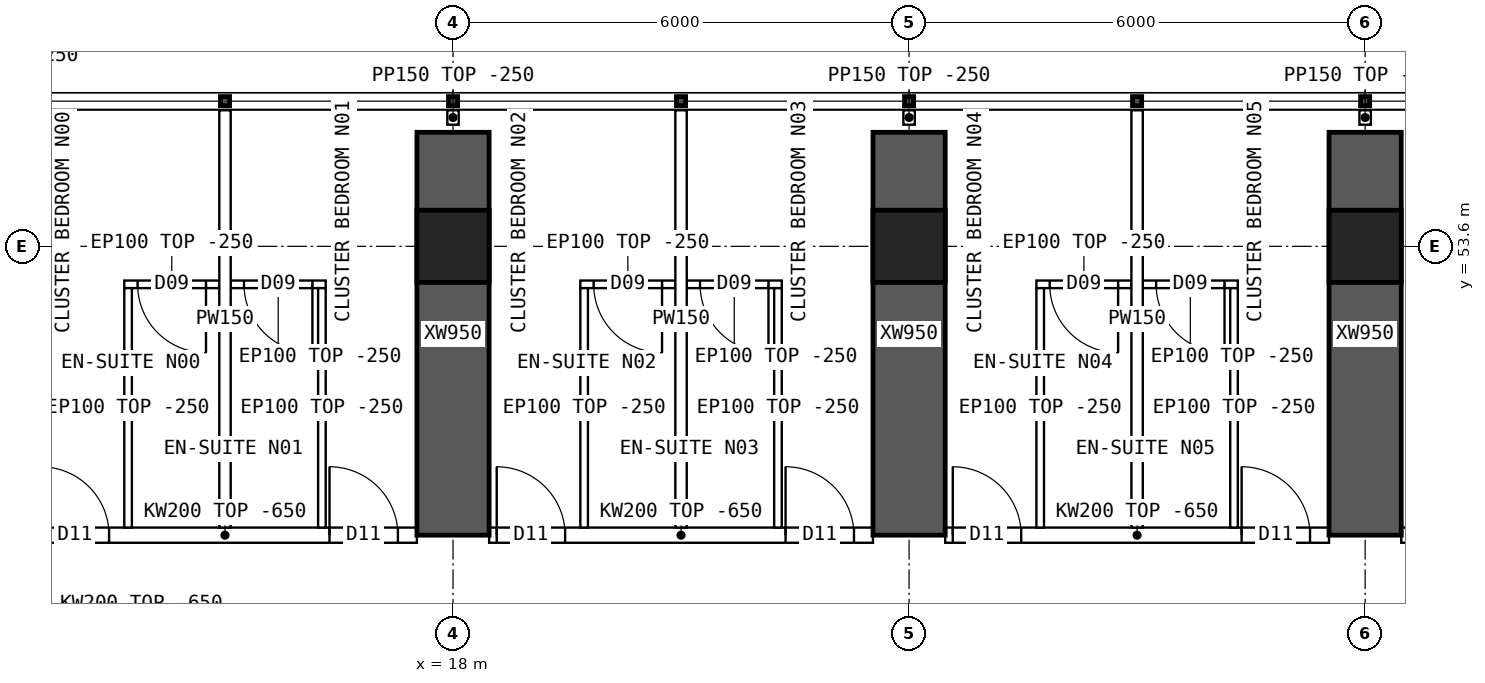
"""IFC4 building model, lengths in metres.
Left out: names, types, materials, properties, quantities, classifications, styles, units other than length and angle.
Written with IfcOpenShell. Run it as: python <this file> out.ifc"""

import sys

from ifc_helpers import new_model, si_unit, direction, frame, frame_2d, origin, origin_2d, place, context, subcontext, project, spatial, polyline, rectangle, hollow_rectangle, outline, extrude, element, fill, save


model = new_model("IFC4")
c1 = context("Model", 3, precision=1e-05, world=origin(), true_north=direction((0.0, 1.0)))
c2 = subcontext(c1, "Body", "Model", "MODEL_VIEW")
j1 = project(units=[si_unit("LENGTHUNIT", "METRE"), si_unit("PLANEANGLEUNIT", "RADIAN")], contexts=[c1])
p1 = place(None, origin())
s1 = spatial("IfcSite", under=j1, at=p1, CompositionType="ELEMENT")
p2 = place(p1, origin())
s2 = spatial("IfcBuilding", under=s1, at=p2, CompositionType="ELEMENT")
p3 = place(p2, frame((0.0, 0.0, 121.9)))
s3 = spatial("IfcBuildingStorey", under=s2, at=p3, CompositionType="ELEMENT", Elevation=121.9)
for number, where, z_axis, x_axis in (
    (1, (18.0, 53.6, 0.0), (0.0, 0.0, 1.0), (1.0, 0.0, 0.0)),
    (2, (24.0, 53.6, 0.0), (0.0, 0.0, 1.0), (1.0, 0.0, 0.0)),
    (3, (30.0, 53.6, 0.0), (0.0, 0.0, 1.0), (1.0, 0.0, 0.0)),
):
    element("IfcColumn", number, at=place(p3, frame(where, z_axis=z_axis, x_axis=x_axis)), inside=s3, PredefinedType="COLUMN", context=c2, shape_type="SweptSolid", body=[
        extrude(hollow_rectangle(XDim=0.95, YDim=0.95, WallThickness=0.095, at=origin_2d()), origin(), (0.0, 0.0, 1.0), 3.75),
    ])
for number, where, z_axis, x_axis in (
    (4, (18.0, 49.8, 0.0), (0.0, 0.0, 1.0), (0.0, 1.0, 0.0)),
    (5, (24.0, 49.8, 0.0), (0.0, 0.0, 1.0), (0.0, 1.0, 0.0)),
    (6, (30.0, 49.8, 0.0), (0.0, 0.0, 1.0), (0.0, 1.0, 0.0)),
):
    element("IfcWall", number, at=place(p3, frame(where, z_axis=z_axis, x_axis=x_axis)), inside=s3, PredefinedType="SHEAR", context=c2, shape_type="SweptSolid", body=[
        extrude(rectangle(XDim=5.3, YDim=0.95, at=frame_2d((2.65, 0.0))), origin(), (0.0, 0.0, 1.0), 3.75),
    ])
p4 = place(p3, frame((12.475, 49.8, 0.0), z_axis=(0.0, 0.0, 1.0), x_axis=(1.0, 0.0, 0.0)))
e7 = element("IfcWall", 7, at=p4, inside=s3, PredefinedType="SOLIDWALL", context=c2, shape_type="SweptSolid", body=[
    extrude(outline(polyline([(0.0, 0.0), (5.05, 0.0), (5.05, 3.1), (0.0, 3.1), (0.0, 0.0)])), frame((0.0, 0.1, 0.0), z_axis=(0.0, -1.0, 0.0), x_axis=(1.0, 0.0, 0.0)), (0.0, 0.0, 1.0), 0.2),
])
p5 = place(p4, frame((0.1, 0.0, 0.0)))
e8 = element("IfcOpeningElement", 8, at=p5, cuts=e7, PredefinedType="OPENING", context=c2, shape_type="SweptSolid", body=[
    extrude(rectangle(XDim=0.9, YDim=2.1, at=frame_2d((0.45, 1.05))), frame((0.0, 0.11, 0.0), z_axis=(0.0, -1.0, 0.0), x_axis=(1.0, 0.0, 0.0)), (0.0, 0.0, 1.0), 0.22),
])
p6 = place(p4, frame((3.9, 0.0, 0.0)))
e9 = element("IfcOpeningElement", 9, at=p6, cuts=e7, PredefinedType="OPENING", context=c2, shape_type="SweptSolid", body=[
    extrude(rectangle(XDim=0.9, YDim=2.1, at=frame_2d((0.45, 1.05))), frame((0.0, 0.11, 0.0), z_axis=(0.0, -1.0, 0.0), x_axis=(1.0, 0.0, 0.0)), (0.0, 0.0, 1.0), 0.22),
])
p7 = place(p3, frame((18.475, 49.8, 0.0), z_axis=(0.0, 0.0, 1.0), x_axis=(1.0, 0.0, 0.0)))
e10 = element("IfcWall", 10, at=p7, inside=s3, PredefinedType="SOLIDWALL", context=c2, shape_type="SweptSolid", body=[
    extrude(outline(polyline([(0.0, 0.0), (5.05, 0.0), (5.05, 3.1), (0.0, 3.1), (0.0, 0.0)])), frame((0.0, 0.1, 0.0), z_axis=(0.0, -1.0, 0.0), x_axis=(1.0, 0.0, 0.0)), (0.0, 0.0, 1.0), 0.2),
])
p8 = place(p7, frame((0.1, 0.0, 0.0)))
e11 = element("IfcOpeningElement", 11, at=p8, cuts=e10, PredefinedType="OPENING", context=c2, shape_type="SweptSolid", body=[
    extrude(rectangle(XDim=0.9, YDim=2.1, at=frame_2d((0.45, 1.05))), frame((0.0, 0.11, 0.0), z_axis=(0.0, -1.0, 0.0), x_axis=(1.0, 0.0, 0.0)), (0.0, 0.0, 1.0), 0.22),
])
p9 = place(p7, frame((3.9, 0.0, 0.0)))
e12 = element("IfcOpeningElement", 12, at=p9, cuts=e10, PredefinedType="OPENING", context=c2, shape_type="SweptSolid", body=[
    extrude(rectangle(XDim=0.9, YDim=2.1, at=frame_2d((0.45, 1.05))), frame((0.0, 0.11, 0.0), z_axis=(0.0, -1.0, 0.0), x_axis=(1.0, 0.0, 0.0)), (0.0, 0.0, 1.0), 0.22),
])
p10 = place(p3, frame((24.475, 49.8, 0.0), z_axis=(0.0, 0.0, 1.0), x_axis=(1.0, 0.0, 0.0)))
e13 = element("IfcWall", 13, at=p10, inside=s3, PredefinedType="SOLIDWALL", context=c2, shape_type="SweptSolid", body=[
    extrude(outline(polyline([(0.0, 0.0), (5.05, 0.0), (5.05, 3.1), (0.0, 3.1), (0.0, 0.0)])), frame((0.0, 0.1, 0.0), z_axis=(0.0, -1.0, 0.0), x_axis=(1.0, 0.0, 0.0)), (0.0, 0.0, 1.0), 0.2),
])
p11 = place(p10, frame((0.1, 0.0, 0.0)))
e14 = element("IfcOpeningElement", 14, at=p11, cuts=e13, PredefinedType="OPENING", context=c2, shape_type="SweptSolid", body=[
    extrude(rectangle(XDim=0.9, YDim=2.1, at=frame_2d((0.45, 1.05))), frame((0.0, 0.11, 0.0), z_axis=(0.0, -1.0, 0.0), x_axis=(1.0, 0.0, 0.0)), (0.0, 0.0, 1.0), 0.22),
])
p12 = place(p10, frame((3.9, 0.0, 0.0)))
e15 = element("IfcOpeningElement", 15, at=p12, cuts=e13, PredefinedType="OPENING", context=c2, shape_type="SweptSolid", body=[
    extrude(rectangle(XDim=0.9, YDim=2.1, at=frame_2d((0.45, 1.05))), frame((0.0, 0.11, 0.0), z_axis=(0.0, -1.0, 0.0), x_axis=(1.0, 0.0, 0.0)), (0.0, 0.0, 1.0), 0.22),
])
p13 = place(p3, frame((30.475, 49.8, 0.0), z_axis=(0.0, 0.0, 1.0), x_axis=(1.0, 0.0, 0.0)))
e16 = element("IfcWall", 16, at=p13, inside=s3, PredefinedType="SOLIDWALL", context=c2, shape_type="SweptSolid", body=[
    extrude(outline(polyline([(0.0, 0.0), (5.05, 0.0), (5.05, 3.1), (0.0, 3.1), (0.0, 0.0)])), frame((0.0, 0.1, 0.0), z_axis=(0.0, -1.0, 0.0), x_axis=(1.0, 0.0, 0.0)), (0.0, 0.0, 1.0), 0.2),
])
p14 = place(p13, frame((0.1, 0.0, 0.0)))
e17 = element("IfcOpeningElement", 17, at=p14, cuts=e16, PredefinedType="OPENING", context=c2, shape_type="SweptSolid", body=[
    extrude(rectangle(XDim=0.9, YDim=2.1, at=frame_2d((0.45, 1.05))), frame((0.0, 0.11, 0.0), z_axis=(0.0, -1.0, 0.0), x_axis=(1.0, 0.0, 0.0)), (0.0, 0.0, 1.0), 0.22),
])
p15 = place(p13, frame((3.9, 0.0, 0.0)))
e18 = element("IfcOpeningElement", 18, at=p15, cuts=e16, PredefinedType="OPENING", context=c2, shape_type="SweptSolid", body=[
    extrude(rectangle(XDim=0.9, YDim=2.1, at=frame_2d((0.45, 1.05))), frame((0.0, 0.11, 0.0), z_axis=(0.0, -1.0, 0.0), x_axis=(1.0, 0.0, 0.0)), (0.0, 0.0, 1.0), 0.22),
])
p16 = place(p3, frame((15.0, 55.39, 0.0), z_axis=(0.0, 0.0, 1.0), x_axis=(0.0, -1.0, 0.0)))
e19 = element("IfcWall", 19, at=p16, inside=s3, PredefinedType="PARTITIONING", context=c2, shape_type="SweptSolid", body=[
    extrude(outline(polyline([(0.0, 0.0), (5.49, 0.0), (5.49, 3.1), (5.442, 3.1), (5.44, 3.5), (1.992, 3.5), (1.99, 3.1), (1.592, 3.1), (1.59, 3.5), (0.0, 3.5), (0.0, 0.0)])), frame((0.0, 0.075, 0.0), z_axis=(0.0, -1.0, 0.0), x_axis=(1.0, 0.0, 0.0)), (0.0, 0.0, 1.0), 0.15),
])
p17 = place(p3, frame((13.675, 53.1, 0.0), z_axis=(0.0, 0.0, 1.0), x_axis=(1.0, 0.0, 0.0)))
e20 = element("IfcWall", 20, at=p17, inside=s3, PredefinedType="PARTITIONING", context=c2, shape_type="SweptSolid", body=[
    extrude(rectangle(XDim=1.25, YDim=0.1, at=frame_2d((0.625, 0.0))), origin(), (0.0, 0.0, 1.0), 3.5),
])
p18 = place(p17, frame((0.175, 0.0, 0.0)))
e21 = element("IfcOpeningElement", 21, at=p18, cuts=e20, PredefinedType="OPENING", context=c2, shape_type="SweptSolid", body=[
    extrude(rectangle(XDim=0.9, YDim=2.1, at=frame_2d((0.45, 1.05))), frame((0.0, 0.06, 0.0), z_axis=(0.0, -1.0, 0.0), x_axis=(1.0, 0.0, 0.0)), (0.0, 0.0, 1.0), 0.12),
])
p19 = place(p3, frame((13.725, 53.05, 0.0), z_axis=(0.0, 0.0, 1.0), x_axis=(0.0, -1.0, 0.0)))
e22 = element("IfcWall", 22, at=p19, inside=s3, PredefinedType="PARTITIONING", context=c2, shape_type="SweptSolid", body=[
    extrude(outline(polyline([(0.0, 0.0), (3.15, 0.0), (3.15, 3.1), (3.102, 3.1), (3.1, 3.5), (0.0, 3.5), (0.0, 0.0)])), frame((0.0, 0.05, 0.0), z_axis=(0.0, -1.0, 0.0), x_axis=(1.0, 0.0, 0.0)), (0.0, 0.0, 1.0), 0.1),
])
p20 = place(p3, frame((15.075, 53.1, 0.0), z_axis=(0.0, 0.0, 1.0), x_axis=(1.0, 0.0, 0.0)))
e23 = element("IfcWall", 23, at=p20, inside=s3, PredefinedType="PARTITIONING", context=c2, shape_type="SweptSolid", body=[
    extrude(rectangle(XDim=1.25, YDim=0.1, at=frame_2d((0.625, 0.0))), origin(), (0.0, 0.0, 1.0), 3.5),
])
p21 = place(p20, frame((0.175, 0.0, 0.0)))
e24 = element("IfcOpeningElement", 24, at=p21, cuts=e23, PredefinedType="OPENING", context=c2, shape_type="SweptSolid", body=[
    extrude(rectangle(XDim=0.9, YDim=2.1, at=frame_2d((0.45, 1.05))), frame((0.0, 0.06, 0.0), z_axis=(0.0, -1.0, 0.0), x_axis=(1.0, 0.0, 0.0)), (0.0, 0.0, 1.0), 0.12),
])
p22 = place(p3, frame((16.275, 53.05, 0.0), z_axis=(0.0, 0.0, 1.0), x_axis=(0.0, -1.0, 0.0)))
e25 = element("IfcWall", 25, at=p22, inside=s3, PredefinedType="PARTITIONING", context=c2, shape_type="SweptSolid", body=[
    extrude(outline(polyline([(0.0, 0.0), (3.15, 0.0), (3.15, 3.1), (3.102, 3.1), (3.1, 3.5), (0.0, 3.5), (0.0, 0.0)])), frame((0.0, 0.05, 0.0), z_axis=(0.0, -1.0, 0.0), x_axis=(1.0, 0.0, 0.0)), (0.0, 0.0, 1.0), 0.1),
])
p23 = place(p3, frame((21.0, 55.39, 0.0), z_axis=(0.0, 0.0, 1.0), x_axis=(0.0, -1.0, 0.0)))
e26 = element("IfcWall", 26, at=p23, inside=s3, PredefinedType="PARTITIONING", context=c2, shape_type="SweptSolid", body=[
    extrude(outline(polyline([(0.0, 0.0), (5.49, 0.0), (5.49, 3.1), (5.442, 3.1), (5.44, 3.5), (1.992, 3.5), (1.99, 3.1), (1.592, 3.1), (1.59, 3.5), (0.0, 3.5), (0.0, 0.0)])), frame((0.0, 0.075, 0.0), z_axis=(0.0, -1.0, 0.0), x_axis=(1.0, 0.0, 0.0)), (0.0, 0.0, 1.0), 0.15),
])
p24 = place(p3, frame((19.675, 53.1, 0.0), z_axis=(0.0, 0.0, 1.0), x_axis=(1.0, 0.0, 0.0)))
e27 = element("IfcWall", 27, at=p24, inside=s3, PredefinedType="PARTITIONING", context=c2, shape_type="SweptSolid", body=[
    extrude(rectangle(XDim=1.25, YDim=0.1, at=frame_2d((0.625, 0.0))), origin(), (0.0, 0.0, 1.0), 3.5),
])
p25 = place(p24, frame((0.175, 0.0, 0.0)))
e28 = element("IfcOpeningElement", 28, at=p25, cuts=e27, PredefinedType="OPENING", context=c2, shape_type="SweptSolid", body=[
    extrude(rectangle(XDim=0.9, YDim=2.1, at=frame_2d((0.45, 1.05))), frame((0.0, 0.06, 0.0), z_axis=(0.0, -1.0, 0.0), x_axis=(1.0, 0.0, 0.0)), (0.0, 0.0, 1.0), 0.12),
])
p26 = place(p3, frame((19.725, 53.05, 0.0), z_axis=(0.0, 0.0, 1.0), x_axis=(0.0, -1.0, 0.0)))
e29 = element("IfcWall", 29, at=p26, inside=s3, PredefinedType="PARTITIONING", context=c2, shape_type="SweptSolid", body=[
    extrude(outline(polyline([(0.0, 0.0), (3.15, 0.0), (3.15, 3.1), (3.102, 3.1), (3.1, 3.5), (0.0, 3.5), (0.0, 0.0)])), frame((0.0, 0.05, 0.0), z_axis=(0.0, -1.0, 0.0), x_axis=(1.0, 0.0, 0.0)), (0.0, 0.0, 1.0), 0.1),
])
p27 = place(p3, frame((21.075, 53.1, 0.0), z_axis=(0.0, 0.0, 1.0), x_axis=(1.0, 0.0, 0.0)))
e30 = element("IfcWall", 30, at=p27, inside=s3, PredefinedType="PARTITIONING", context=c2, shape_type="SweptSolid", body=[
    extrude(rectangle(XDim=1.25, YDim=0.1, at=frame_2d((0.625, 0.0))), origin(), (0.0, 0.0, 1.0), 3.5),
])
p28 = place(p27, frame((0.175, 0.0, 0.0)))
e31 = element("IfcOpeningElement", 31, at=p28, cuts=e30, PredefinedType="OPENING", context=c2, shape_type="SweptSolid", body=[
    extrude(rectangle(XDim=0.9, YDim=2.1, at=frame_2d((0.45, 1.05))), frame((0.0, 0.06, 0.0), z_axis=(0.0, -1.0, 0.0), x_axis=(1.0, 0.0, 0.0)), (0.0, 0.0, 1.0), 0.12),
])
p29 = place(p3, frame((22.275, 53.05, 0.0), z_axis=(0.0, 0.0, 1.0), x_axis=(0.0, -1.0, 0.0)))
e32 = element("IfcWall", 32, at=p29, inside=s3, PredefinedType="PARTITIONING", context=c2, shape_type="SweptSolid", body=[
    extrude(outline(polyline([(0.0, 0.0), (3.15, 0.0), (3.15, 3.1), (3.102, 3.1), (3.1, 3.5), (0.0, 3.5), (0.0, 0.0)])), frame((0.0, 0.05, 0.0), z_axis=(0.0, -1.0, 0.0), x_axis=(1.0, 0.0, 0.0)), (0.0, 0.0, 1.0), 0.1),
])
p30 = place(p3, frame((27.0, 55.39, 0.0), z_axis=(0.0, 0.0, 1.0), x_axis=(0.0, -1.0, 0.0)))
e33 = element("IfcWall", 33, at=p30, inside=s3, PredefinedType="PARTITIONING", context=c2, shape_type="SweptSolid", body=[
    extrude(outline(polyline([(0.0, 0.0), (5.49, 0.0), (5.49, 3.1), (5.442, 3.1), (5.44, 3.5), (1.992, 3.5), (1.99, 3.1), (1.592, 3.1), (1.59, 3.5), (0.0, 3.5), (0.0, 0.0)])), frame((0.0, 0.075, 0.0), z_axis=(0.0, -1.0, 0.0), x_axis=(1.0, 0.0, 0.0)), (0.0, 0.0, 1.0), 0.15),
])
p31 = place(p3, frame((25.675, 53.1, 0.0), z_axis=(0.0, 0.0, 1.0), x_axis=(1.0, 0.0, 0.0)))
e34 = element("IfcWall", 34, at=p31, inside=s3, PredefinedType="PARTITIONING", context=c2, shape_type="SweptSolid", body=[
    extrude(rectangle(XDim=1.25, YDim=0.1, at=frame_2d((0.625, 0.0))), origin(), (0.0, 0.0, 1.0), 3.5),
])
p32 = place(p31, frame((0.175, 0.0, 0.0)))
e35 = element("IfcOpeningElement", 35, at=p32, cuts=e34, PredefinedType="OPENING", context=c2, shape_type="SweptSolid", body=[
    extrude(rectangle(XDim=0.9, YDim=2.1, at=frame_2d((0.45, 1.05))), frame((0.0, 0.06, 0.0), z_axis=(0.0, -1.0, 0.0), x_axis=(1.0, 0.0, 0.0)), (0.0, 0.0, 1.0), 0.12),
])
p33 = place(p3, frame((25.725, 53.05, 0.0), z_axis=(0.0, 0.0, 1.0), x_axis=(0.0, -1.0, 0.0)))
e36 = element("IfcWall", 36, at=p33, inside=s3, PredefinedType="PARTITIONING", context=c2, shape_type="SweptSolid", body=[
    extrude(outline(polyline([(0.0, 0.0), (3.15, 0.0), (3.15, 3.1), (3.102, 3.1), (3.1, 3.5), (0.0, 3.5), (0.0, 0.0)])), frame((0.0, 0.05, 0.0), z_axis=(0.0, -1.0, 0.0), x_axis=(1.0, 0.0, 0.0)), (0.0, 0.0, 1.0), 0.1),
])
p34 = place(p3, frame((27.075, 53.1, 0.0), z_axis=(0.0, 0.0, 1.0), x_axis=(1.0, 0.0, 0.0)))
e37 = element("IfcWall", 37, at=p34, inside=s3, PredefinedType="PARTITIONING", context=c2, shape_type="SweptSolid", body=[
    extrude(rectangle(XDim=1.25, YDim=0.1, at=frame_2d((0.625, 0.0))), origin(), (0.0, 0.0, 1.0), 3.5),
])
p35 = place(p34, frame((0.175, 0.0, 0.0)))
e38 = element("IfcOpeningElement", 38, at=p35, cuts=e37, PredefinedType="OPENING", context=c2, shape_type="SweptSolid", body=[
    extrude(rectangle(XDim=0.9, YDim=2.1, at=frame_2d((0.45, 1.05))), frame((0.0, 0.06, 0.0), z_axis=(0.0, -1.0, 0.0), x_axis=(1.0, 0.0, 0.0)), (0.0, 0.0, 1.0), 0.12),
])
p36 = place(p3, frame((28.275, 53.05, 0.0), z_axis=(0.0, 0.0, 1.0), x_axis=(0.0, -1.0, 0.0)))
e39 = element("IfcWall", 39, at=p36, inside=s3, PredefinedType="PARTITIONING", context=c2, shape_type="SweptSolid", body=[
    extrude(outline(polyline([(0.0, 0.0), (3.15, 0.0), (3.15, 3.1), (3.102, 3.1), (3.1, 3.5), (0.0, 3.5), (0.0, 0.0)])), frame((0.0, 0.05, 0.0), z_axis=(0.0, -1.0, 0.0), x_axis=(1.0, 0.0, 0.0)), (0.0, 0.0, 1.0), 0.1),
])
for number, where, z_axis, x_axis in (
    (40, (18.0, 55.2, 0.0), (0.0, 0.0, 1.0), (0.0, 1.0, 0.0)),
    (41, (24.0, 55.2, 0.0), (0.0, 0.0, 1.0), (0.0, 1.0, 0.0)),
    (42, (30.0, 55.2, 0.0), (0.0, 0.0, 1.0), (0.0, 1.0, 0.0)),
):
    element("IfcWall", number, at=place(p3, frame(where, z_axis=z_axis, x_axis=x_axis)), inside=s3, PredefinedType="PARTITIONING", context=c2, shape_type="SweptSolid", body=[
        extrude(rectangle(XDim=0.19, YDim=0.15, at=frame_2d((0.095, 0.0))), origin(), (0.0, 0.0, 1.0), 3.5),
    ])
p37 = place(p18, origin())
e43 = element("IfcDoor", 43, at=p37, inside=s3, OperationType="SINGLE_SWING_RIGHT", PredefinedType="DOOR", context=c2, shape_type="SweptSolid", body=[
    extrude(rectangle(XDim=0.9, YDim=2.1, at=frame_2d((0.45, 1.05))), frame((0.0, 0.025, 0.0), z_axis=(0.0, -1.0, 0.0), x_axis=(1.0, 0.0, 0.0)), (0.0, 0.0, 1.0), 0.05),
])
fill(e21, e43)
p38 = place(p5, origin())
e44 = element("IfcDoor", 44, at=p38, inside=s3, OperationType="SINGLE_SWING_LEFT", PredefinedType="DOOR", context=c2, shape_type="SweptSolid", body=[
    extrude(rectangle(XDim=0.9, YDim=2.1, at=frame_2d((0.45, 1.05))), frame((0.0, 0.025, 0.0), z_axis=(0.0, -1.0, 0.0), x_axis=(1.0, 0.0, 0.0)), (0.0, 0.0, 1.0), 0.05),
])
fill(e8, e44)
p39 = place(p21, origin())
e45 = element("IfcDoor", 45, at=p39, inside=s3, OperationType="SINGLE_SWING_RIGHT", PredefinedType="DOOR", context=c2, shape_type="SweptSolid", body=[
    extrude(rectangle(XDim=0.9, YDim=2.1, at=frame_2d((0.45, 1.05))), frame((0.0, 0.025, 0.0), z_axis=(0.0, -1.0, 0.0), x_axis=(1.0, 0.0, 0.0)), (0.0, 0.0, 1.0), 0.05),
])
fill(e24, e45)
p40 = place(p6, origin())
e46 = element("IfcDoor", 46, at=p40, inside=s3, OperationType="SINGLE_SWING_LEFT", PredefinedType="DOOR", context=c2, shape_type="SweptSolid", body=[
    extrude(rectangle(XDim=0.9, YDim=2.1, at=frame_2d((0.45, 1.05))), frame((0.0, 0.025, 0.0), z_axis=(0.0, -1.0, 0.0), x_axis=(1.0, 0.0, 0.0)), (0.0, 0.0, 1.0), 0.05),
])
fill(e9, e46)
p41 = place(p25, origin())
e47 = element("IfcDoor", 47, at=p41, inside=s3, OperationType="SINGLE_SWING_RIGHT", PredefinedType="DOOR", context=c2, shape_type="SweptSolid", body=[
    extrude(rectangle(XDim=0.9, YDim=2.1, at=frame_2d((0.45, 1.05))), frame((0.0, 0.025, 0.0), z_axis=(0.0, -1.0, 0.0), x_axis=(1.0, 0.0, 0.0)), (0.0, 0.0, 1.0), 0.05),
])
fill(e28, e47)
p42 = place(p8, origin())
e48 = element("IfcDoor", 48, at=p42, inside=s3, OperationType="SINGLE_SWING_LEFT", PredefinedType="DOOR", context=c2, shape_type="SweptSolid", body=[
    extrude(rectangle(XDim=0.9, YDim=2.1, at=frame_2d((0.45, 1.05))), frame((0.0, 0.025, 0.0), z_axis=(0.0, -1.0, 0.0), x_axis=(1.0, 0.0, 0.0)), (0.0, 0.0, 1.0), 0.05),
])
fill(e11, e48)
p43 = place(p28, origin())
e49 = element("IfcDoor", 49, at=p43, inside=s3, OperationType="SINGLE_SWING_RIGHT", PredefinedType="DOOR", context=c2, shape_type="SweptSolid", body=[
    extrude(rectangle(XDim=0.9, YDim=2.1, at=frame_2d((0.45, 1.05))), frame((0.0, 0.025, 0.0), z_axis=(0.0, -1.0, 0.0), x_axis=(1.0, 0.0, 0.0)), (0.0, 0.0, 1.0), 0.05),
])
fill(e31, e49)
p44 = place(p9, origin())
e50 = element("IfcDoor", 50, at=p44, inside=s3, OperationType="SINGLE_SWING_LEFT", PredefinedType="DOOR", context=c2, shape_type="SweptSolid", body=[
    extrude(rectangle(XDim=0.9, YDim=2.1, at=frame_2d((0.45, 1.05))), frame((0.0, 0.025, 0.0), z_axis=(0.0, -1.0, 0.0), x_axis=(1.0, 0.0, 0.0)), (0.0, 0.0, 1.0), 0.05),
])
fill(e12, e50)
p45 = place(p32, origin())
e51 = element("IfcDoor", 51, at=p45, inside=s3, OperationType="SINGLE_SWING_RIGHT", PredefinedType="DOOR", context=c2, shape_type="SweptSolid", body=[
    extrude(rectangle(XDim=0.9, YDim=2.1, at=frame_2d((0.45, 1.05))), frame((0.0, 0.025, 0.0), z_axis=(0.0, -1.0, 0.0), x_axis=(1.0, 0.0, 0.0)), (0.0, 0.0, 1.0), 0.05),
])
fill(e35, e51)
p46 = place(p11, origin())
e52 = element("IfcDoor", 52, at=p46, inside=s3, OperationType="SINGLE_SWING_LEFT", PredefinedType="DOOR", context=c2, shape_type="SweptSolid", body=[
    extrude(rectangle(XDim=0.9, YDim=2.1, at=frame_2d((0.45, 1.05))), frame((0.0, 0.025, 0.0), z_axis=(0.0, -1.0, 0.0), x_axis=(1.0, 0.0, 0.0)), (0.0, 0.0, 1.0), 0.05),
])
fill(e14, e52)
p47 = place(p35, origin())
e53 = element("IfcDoor", 53, at=p47, inside=s3, OperationType="SINGLE_SWING_RIGHT", PredefinedType="DOOR", context=c2, shape_type="SweptSolid", body=[
    extrude(rectangle(XDim=0.9, YDim=2.1, at=frame_2d((0.45, 1.05))), frame((0.0, 0.025, 0.0), z_axis=(0.0, -1.0, 0.0), x_axis=(1.0, 0.0, 0.0)), (0.0, 0.0, 1.0), 0.05),
])
fill(e38, e53)
p48 = place(p12, origin())
e54 = element("IfcDoor", 54, at=p48, inside=s3, OperationType="SINGLE_SWING_LEFT", PredefinedType="DOOR", context=c2, shape_type="SweptSolid", body=[
    extrude(rectangle(XDim=0.9, YDim=2.1, at=frame_2d((0.45, 1.05))), frame((0.0, 0.025, 0.0), z_axis=(0.0, -1.0, 0.0), x_axis=(1.0, 0.0, 0.0)), (0.0, 0.0, 1.0), 0.05),
])
fill(e15, e54)
save(model, sys.argv[1])
